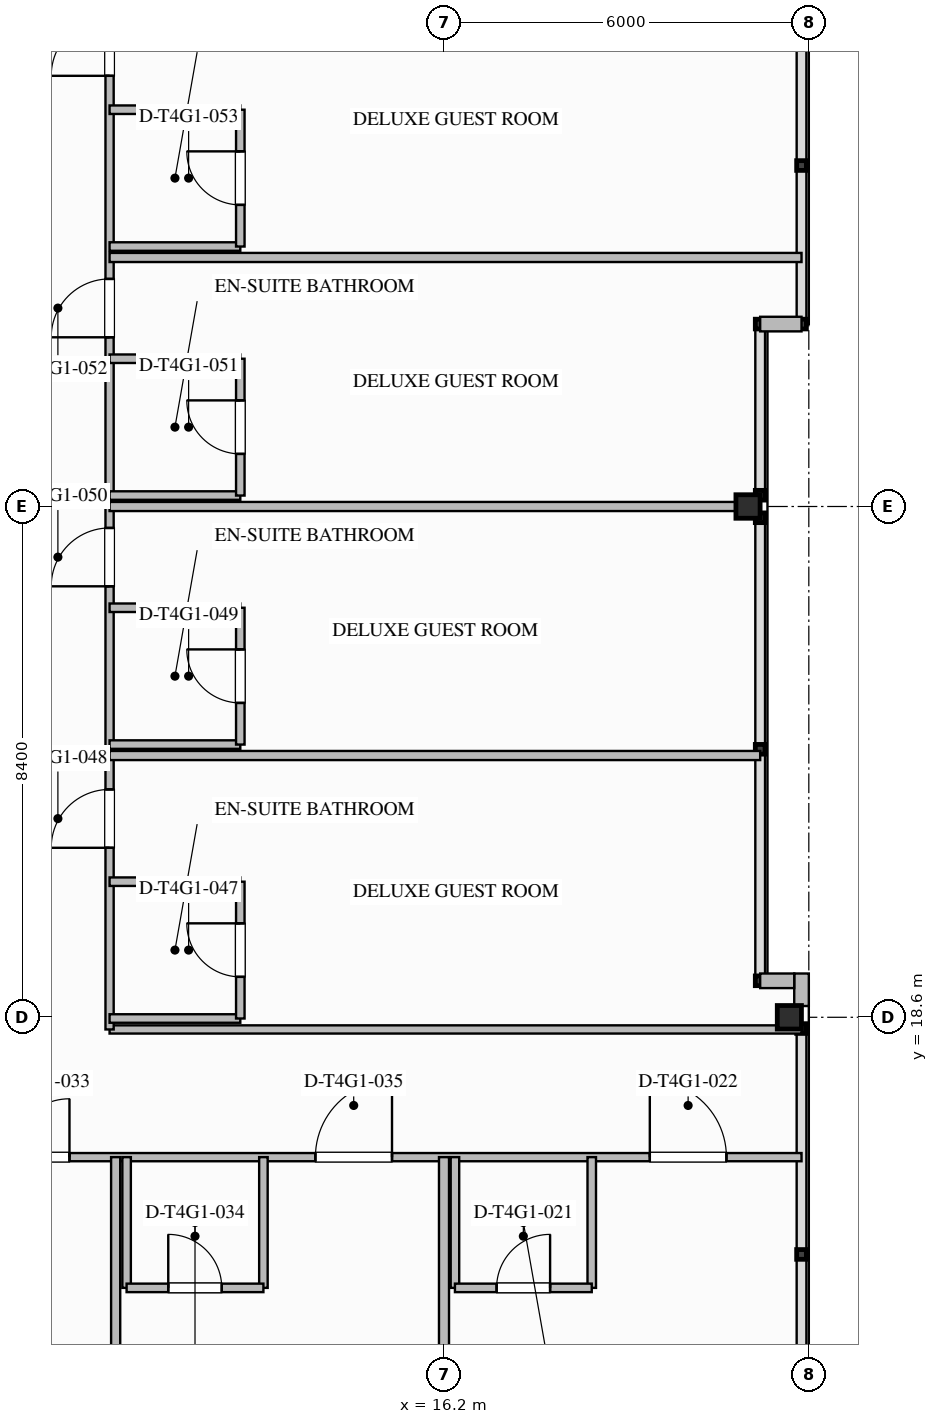
"""IFC4 building model, lengths in metres.
Left out: names, types, materials, properties, quantities, classifications, styles, units other than length and angle.
Written with IfcOpenShell. Run it as: python <this file> out.ifc"""

import sys

from ifc_helpers import new_model, si_unit, direction, frame, frame_2d, origin, origin_2d, place, context, subcontext, project, spatial, rectangle, i_section, extrude, element, fill, save


model = new_model("IFC4")
c1 = context("Model", 3, precision=1e-05, world=origin(), true_north=direction((0.0, 1.0)))
c2 = subcontext(c1, "Body", "Model", "MODEL_VIEW")
j1 = project(units=[si_unit("LENGTHUNIT", "METRE"), si_unit("PLANEANGLEUNIT", "RADIAN")], contexts=[c1])
p1 = place(None, origin())
s1 = spatial("IfcSite", under=j1, at=p1, CompositionType="ELEMENT")
p2 = place(p1, origin())
s2 = spatial("IfcBuilding", under=s1, at=p2, CompositionType="ELEMENT")
p3 = place(p2, frame((0.0, 0.0, 208.7)))
s3 = spatial("IfcBuildingStorey", under=s2, at=p3, CompositionType="ELEMENT", Elevation=208.7)
for number, where, z_axis, x_axis in (
    (1, (21.88, 18.6, 0.0), (0.0, 0.0, 1.0), (1.0, 0.0, 0.0)),
    (2, (21.2, 27.0, 0.0), (0.0, 0.0, 1.0), (1.0, 0.0, 0.0)),
):
    element("IfcColumn", number, at=place(p3, frame(where, z_axis=z_axis, x_axis=x_axis)), inside=s3, PredefinedType="COLUMN", context=c2, shape_type="SweptSolid", body=[
        extrude(i_section(OverallWidth=0.397, OverallDepth=0.387, WebThickness=0.021, FlangeThickness=0.033, FilletRadius=0.025, at=origin_2d()), origin(), (0.0, 0.0, 1.0), 3.597),
    ])
p4 = place(p3, frame((22.08, 19.32, 0.0), z_axis=(0.0, 0.0, 1.0), x_axis=(0.0, -1.0, 0.0)))
e3 = element("IfcWall", 3, at=p4, inside=s3, PredefinedType="STANDARD", context=c2, shape_type="SweptSolid", body=[
    extrude(rectangle(XDim=0.535, YDim=0.24, at=frame_2d((0.267, 0.0))), origin(), (0.0, 0.0, 1.0), 3.34),
])
p5 = place(p3, frame((22.08, 30.0, 0.0), z_axis=(0.0, 0.0, 1.0), x_axis=(-1.0, 0.0, 0.0)))
e4 = element("IfcWall", 4, at=p5, inside=s3, PredefinedType="STANDARD", context=c2, shape_type="SweptSolid", body=[
    extrude(rectangle(XDim=0.68, YDim=0.24, at=frame_2d((0.34, 0.0))), origin(), (0.0, 0.0, 1.0), 3.34),
])
p6 = place(p3, frame((21.4, 19.2, 0.0), z_axis=(0.0, 0.0, 1.0), x_axis=(1.0, 0.0, 0.0)))
e5 = element("IfcWall", 5, at=p6, inside=s3, PredefinedType="STANDARD", context=c2, shape_type="SweptSolid", body=[
    extrude(rectangle(XDim=0.56, YDim=0.24, at=frame_2d((0.28, 0.0))), origin(), (0.0, 0.0, 1.0), 3.34),
])
p7 = place(p3, frame((-16.2, 16.3, 0.0), z_axis=(0.0, 0.0, 1.0), x_axis=(1.0, 0.0, 0.0)))
e6 = element("IfcWall", 6, at=p7, inside=s3, PredefinedType="PARTITIONING", context=c2, shape_type="SweptSolid", body=[
    extrude(rectangle(XDim=38.28, YDim=0.135, at=frame_2d((19.14, 0.0))), origin(), (0.0, 0.0, 1.0), 3.34),
])
p8 = place(p7, frame((35.785, 0.0, 0.0)))
e7 = element("IfcOpeningElement", 7, at=p8, cuts=e6, PredefinedType="OPENING", context=c2, shape_type="SweptSolid", body=[
    extrude(rectangle(XDim=1.26, YDim=2.2, at=frame_2d((0.63, 1.1))), frame((0.0, 0.077, 0.0), z_axis=(0.0, -1.0, 0.0), x_axis=(1.0, 0.0, 0.0)), (0.0, 0.0, 1.0), 0.155),
])
p9 = place(p7, frame((3.285, 0.0, 0.0)))
e8 = element("IfcOpeningElement", 8, at=p9, cuts=e6, PredefinedType="OPENING", context=c2, shape_type="SweptSolid", body=[
    extrude(rectangle(XDim=1.26, YDim=2.2, at=frame_2d((0.63, 1.1))), frame((0.0, 0.077, 0.0), z_axis=(0.0, -1.0, 0.0), x_axis=(1.0, 0.0, 0.0)), (0.0, 0.0, 1.0), 0.155),
])
p10 = place(p7, frame((8.59, 0.0, 0.0)))
e9 = element("IfcOpeningElement", 9, at=p10, cuts=e6, PredefinedType="OPENING", context=c2, shape_type="SweptSolid", body=[
    extrude(rectangle(XDim=0.96, YDim=2.15, at=frame_2d((0.48, 1.075))), frame((0.0, 0.077, 0.0), z_axis=(0.0, -1.0, 0.0), x_axis=(1.0, 0.0, 0.0)), (0.0, 0.0, 1.0), 0.155),
])
p11 = place(p7, frame((12.744, 0.0, 0.0)))
e10 = element("IfcOpeningElement", 10, at=p11, cuts=e6, PredefinedType="OPENING", context=c2, shape_type="SweptSolid", body=[
    extrude(rectangle(XDim=1.02, YDim=2.15, at=frame_2d((0.51, 1.075))), frame((0.0, 0.077, 0.0), z_axis=(0.0, -1.0, 0.0), x_axis=(1.0, 0.0, 0.0)), (0.0, 0.0, 1.0), 0.155),
])
p12 = place(p7, frame((19.73, 0.0, 0.0)))
e11 = element("IfcOpeningElement", 11, at=p12, cuts=e6, PredefinedType="OPENING", context=c2, shape_type="SweptSolid", body=[
    extrude(rectangle(XDim=1.26, YDim=2.2, at=frame_2d((0.63, 1.1))), frame((0.0, 0.077, 0.0), z_axis=(0.0, -1.0, 0.0), x_axis=(1.0, 0.0, 0.0)), (0.0, 0.0, 1.0), 0.155),
])
p13 = place(p7, frame((25.281, 0.0, 0.0)))
e12 = element("IfcOpeningElement", 12, at=p13, cuts=e6, PredefinedType="OPENING", context=c2, shape_type="SweptSolid", body=[
    extrude(rectangle(XDim=0.96, YDim=2.15, at=frame_2d((0.48, 1.075))), frame((0.0, 0.077, 0.0), z_axis=(0.0, -1.0, 0.0), x_axis=(1.0, 0.0, 0.0)), (0.0, 0.0, 1.0), 0.155),
])
p14 = place(p7, frame((30.285, 0.0, 0.0)))
e13 = element("IfcOpeningElement", 13, at=p14, cuts=e6, PredefinedType="OPENING", context=c2, shape_type="SweptSolid", body=[
    extrude(rectangle(XDim=1.26, YDim=2.2, at=frame_2d((0.63, 1.1))), frame((0.0, 0.077, 0.0), z_axis=(0.0, -1.0, 0.0), x_axis=(1.0, 0.0, 0.0)), (0.0, 0.0, 1.0), 0.155),
])
p15 = place(p3, frame((10.7, 18.4, 0.0), z_axis=(0.0, 0.0, 1.0), x_axis=(1.0, 0.0, 0.0)))
e14 = element("IfcWall", 14, at=p15, inside=s3, PredefinedType="PARTITIONING", context=c2, shape_type="SweptSolid", body=[
    extrude(rectangle(XDim=11.38, YDim=0.135, at=frame_2d((5.69, 0.0))), origin(), (0.0, 0.0, 1.0), 2.718),
])
p16 = place(p3, frame((10.7, 18.4, 0.0), z_axis=(0.0, 0.0, 1.0), x_axis=(0.0, 1.0, 0.0)))
e15 = element("IfcWall", 15, at=p16, inside=s3, PredefinedType="PARTITIONING", context=c2, shape_type="SweptSolid", body=[
    extrude(rectangle(XDim=17.2, YDim=0.135, at=frame_2d((8.6, 0.0))), origin(), (0.0, 0.0, 1.0), 3.34),
])
p17 = place(p16, frame((2.987, 0.0, 0.0)))
e16 = element("IfcOpeningElement", 16, at=p17, cuts=e15, PredefinedType="OPENING", context=c2, shape_type="SweptSolid", body=[
    extrude(rectangle(XDim=0.96, YDim=2.15, at=frame_2d((0.48, 1.075))), frame((0.0, 0.077, 0.0), z_axis=(0.0, -1.0, 0.0), x_axis=(1.0, 0.0, 0.0)), (0.0, 0.0, 1.0), 0.155),
])
p18 = place(p16, frame((7.287, 0.0, 0.0)))
e17 = element("IfcOpeningElement", 17, at=p18, cuts=e15, PredefinedType="OPENING", context=c2, shape_type="SweptSolid", body=[
    extrude(rectangle(XDim=0.96, YDim=2.15, at=frame_2d((0.48, 1.075))), frame((0.0, 0.077, 0.0), z_axis=(0.0, -1.0, 0.0), x_axis=(1.0, 0.0, 0.0)), (0.0, 0.0, 1.0), 0.155),
])
p19 = place(p16, frame((11.383, 0.0, 0.0)))
e18 = element("IfcOpeningElement", 18, at=p19, cuts=e15, PredefinedType="OPENING", context=c2, shape_type="SweptSolid", body=[
    extrude(rectangle(XDim=0.96, YDim=2.15, at=frame_2d((0.48, 1.075))), frame((0.0, 0.077, 0.0), z_axis=(0.0, -1.0, 0.0), x_axis=(1.0, 0.0, 0.0)), (0.0, 0.0, 1.0), 0.155),
])
p20 = place(p16, frame((15.683, 0.0, 0.0)))
e19 = element("IfcOpeningElement", 19, at=p20, cuts=e15, PredefinedType="OPENING", context=c2, shape_type="SweptSolid", body=[
    extrude(rectangle(XDim=0.96, YDim=2.15, at=frame_2d((0.48, 1.075))), frame((0.0, 0.077, 0.0), z_axis=(0.0, -1.0, 0.0), x_axis=(1.0, 0.0, 0.0)), (0.0, 0.0, 1.0), 0.155),
])
p21 = place(p3, frame((16.2, 0.12, 0.0), z_axis=(0.0, 0.0, 1.0), x_axis=(0.0, 1.0, 0.0)))
e20 = element("IfcWall", 20, at=p21, inside=s3, PredefinedType="PARTITIONING", context=c2, shape_type="SweptSolid", body=[
    extrude(rectangle(XDim=16.18, YDim=0.165, at=frame_2d((8.09, 0.0))), origin(), (0.0, 0.0, 1.0), 2.714),
])
p22 = place(p3, frame((16.38, 16.3, 0.0), z_axis=(0.0, 0.0, 1.0), x_axis=(0.0, -1.0, 0.0)))
e21 = element("IfcWall", 21, at=p22, inside=s3, PredefinedType="PLUMBINGWALL", context=c2, shape_type="SweptSolid", body=[
    extrude(rectangle(XDim=2.15, YDim=0.14, at=frame_2d((1.075, 0.0))), origin(), (0.0, 0.0, 1.0), 2.714),
])
p23 = place(p3, frame((18.63, 16.3, 0.0), z_axis=(0.0, 0.0, 1.0), x_axis=(0.0, -1.0, 0.0)))
e22 = element("IfcWall", 22, at=p23, inside=s3, PredefinedType="PLUMBINGWALL", context=c2, shape_type="SweptSolid", body=[
    extrude(rectangle(XDim=2.15, YDim=0.14, at=frame_2d((1.075, 0.0))), origin(), (0.0, 0.0, 1.0), 3.34),
])
p24 = place(p3, frame((16.38, 14.15, 0.0), z_axis=(0.0, 0.0, 1.0), x_axis=(1.0, 0.0, 0.0)))
e23 = element("IfcWall", 23, at=p24, inside=s3, PredefinedType="PLUMBINGWALL", context=c2, shape_type="SweptSolid", body=[
    extrude(rectangle(XDim=2.25, YDim=0.14, at=frame_2d((1.125, 0.0))), origin(), (0.0, 0.0, 1.0), 3.34),
])
p25 = place(p24, frame((0.685, 0.0, 0.0)))
e24 = element("IfcOpeningElement", 24, at=p25, cuts=e23, PredefinedType="OPENING", context=c2, shape_type="SweptSolid", body=[
    extrude(rectangle(XDim=0.88, YDim=2.1, at=frame_2d((0.44, 1.05))), frame((0.0, 0.08, 0.0), z_axis=(0.0, -1.0, 0.0), x_axis=(1.0, 0.0, 0.0)), (0.0, 0.0, 1.0), 0.16),
])
p26 = place(p3, frame((10.8, 0.12, 0.0), z_axis=(0.0, 0.0, 1.0), x_axis=(0.0, 1.0, 0.0)))
e25 = element("IfcWall", 25, at=p26, inside=s3, PredefinedType="PARTITIONING", context=c2, shape_type="SweptSolid", body=[
    extrude(rectangle(XDim=16.18, YDim=0.15, at=frame_2d((8.09, 0.0))), origin(), (0.0, 0.0, 1.0), 3.34),
])
for number, where, z_axis, x_axis in (
    (26, (10.98, 16.3, 0.0), (0.0, 0.0, 1.0), (0.0, -1.0, 0.0)),
    (27, (13.23, 16.3, 0.0), (0.0, 0.0, 1.0), (0.0, -1.0, 0.0)),
):
    element("IfcWall", number, at=place(p3, frame(where, z_axis=z_axis, x_axis=x_axis)), inside=s3, PredefinedType="PLUMBINGWALL", context=c2, shape_type="SweptSolid", body=[
        extrude(rectangle(XDim=2.15, YDim=0.14, at=frame_2d((1.075, 0.0))), origin(), (0.0, 0.0, 1.0), 3.34),
    ])
p27 = place(p3, frame((10.98, 14.15, 0.0), z_axis=(0.0, 0.0, 1.0), x_axis=(1.0, 0.0, 0.0)))
e28 = element("IfcWall", 28, at=p27, inside=s3, PredefinedType="PLUMBINGWALL", context=c2, shape_type="SweptSolid", body=[
    extrude(rectangle(XDim=2.25, YDim=0.14, at=frame_2d((1.125, 0.0))), origin(), (0.0, 0.0, 1.0), 3.34),
])
p28 = place(p27, frame((0.685, 0.0, 0.0)))
e29 = element("IfcOpeningElement", 29, at=p28, cuts=e28, PredefinedType="OPENING", context=c2, shape_type="SweptSolid", body=[
    extrude(rectangle(XDim=0.88, YDim=2.1, at=frame_2d((0.44, 1.05))), frame((0.0, 0.08, 0.0), z_axis=(0.0, -1.0, 0.0), x_axis=(1.0, 0.0, 0.0)), (0.0, 0.0, 1.0), 0.16),
])
p29 = place(p3, frame((10.7, 18.58, 0.0), z_axis=(0.0, 0.0, 1.0), x_axis=(1.0, 0.0, 0.0)))
e30 = element("IfcWall", 30, at=p29, inside=s3, PredefinedType="PLUMBINGWALL", context=c2, shape_type="SweptSolid", body=[
    extrude(rectangle(XDim=2.15, YDim=0.14, at=frame_2d((1.075, 0.0))), origin(), (0.0, 0.0, 1.0), 2.718),
])
p30 = place(p3, frame((10.7, 20.83, 0.0), z_axis=(0.0, 0.0, 1.0), x_axis=(1.0, 0.0, 0.0)))
e31 = element("IfcWall", 31, at=p30, inside=s3, PredefinedType="PLUMBINGWALL", context=c2, shape_type="SweptSolid", body=[
    extrude(rectangle(XDim=2.15, YDim=0.14, at=frame_2d((1.075, 0.0))), origin(), (0.0, 0.0, 1.0), 3.34),
])
p31 = place(p3, frame((12.85, 18.58, 0.0), z_axis=(0.0, 0.0, 1.0), x_axis=(0.0, 1.0, 0.0)))
e32 = element("IfcWall", 32, at=p31, inside=s3, PredefinedType="PLUMBINGWALL", context=c2, shape_type="SweptSolid", body=[
    extrude(rectangle(XDim=2.25, YDim=0.14, at=frame_2d((1.125, 0.0))), origin(), (0.0, 0.0, 1.0), 3.34),
])
p32 = place(p31, frame((0.685, 0.0, 0.0)))
e33 = element("IfcOpeningElement", 33, at=p32, cuts=e32, PredefinedType="OPENING", context=c2, shape_type="SweptSolid", body=[
    extrude(rectangle(XDim=0.88, YDim=2.1, at=frame_2d((0.44, 1.05))), frame((0.0, 0.08, 0.0), z_axis=(0.0, -1.0, 0.0), x_axis=(1.0, 0.0, 0.0)), (0.0, 0.0, 1.0), 0.16),
])
p33 = place(p3, frame((10.7, 22.905, 0.0), z_axis=(0.0, 0.0, 1.0), x_axis=(1.0, 0.0, 0.0)))
e34 = element("IfcWall", 34, at=p33, inside=s3, PredefinedType="PARTITIONING", context=c2, shape_type="SweptSolid", body=[
    extrude(rectangle(XDim=10.7, YDim=0.15, at=frame_2d((5.35, 0.0))), origin(), (0.0, 0.0, 1.0), 3.34),
])
for number, where, z_axis, x_axis in (
    (35, (10.7, 23.085, 0.0), (0.0, 0.0, 1.0), (1.0, 0.0, 0.0)),
    (36, (10.7, 25.335, 0.0), (0.0, 0.0, 1.0), (1.0, 0.0, 0.0)),
):
    element("IfcWall", number, at=place(p3, frame(where, z_axis=z_axis, x_axis=x_axis)), inside=s3, PredefinedType="PLUMBINGWALL", context=c2, shape_type="SweptSolid", body=[
        extrude(rectangle(XDim=2.15, YDim=0.14, at=frame_2d((1.075, 0.0))), origin(), (0.0, 0.0, 1.0), 3.34),
    ])
p34 = place(p3, frame((12.85, 23.085, 0.0), z_axis=(0.0, 0.0, 1.0), x_axis=(0.0, 1.0, 0.0)))
e37 = element("IfcWall", 37, at=p34, inside=s3, PredefinedType="PLUMBINGWALL", context=c2, shape_type="SweptSolid", body=[
    extrude(rectangle(XDim=2.25, YDim=0.14, at=frame_2d((1.125, 0.0))), origin(), (0.0, 0.0, 1.0), 3.34),
])
p35 = place(p34, frame((0.685, 0.0, 0.0)))
e38 = element("IfcOpeningElement", 38, at=p35, cuts=e37, PredefinedType="OPENING", context=c2, shape_type="SweptSolid", body=[
    extrude(rectangle(XDim=0.88, YDim=2.1, at=frame_2d((0.44, 1.05))), frame((0.0, 0.08, 0.0), z_axis=(0.0, -1.0, 0.0), x_axis=(1.0, 0.0, 0.0)), (0.0, 0.0, 1.0), 0.16),
])
p36 = place(p3, frame((10.7, 27.0, 0.0), z_axis=(0.0, 0.0, 1.0), x_axis=(1.0, 0.0, 0.0)))
e39 = element("IfcWall", 39, at=p36, inside=s3, PredefinedType="PARTITIONING", context=c2, shape_type="SweptSolid", body=[
    extrude(rectangle(XDim=10.7, YDim=0.15, at=frame_2d((5.35, 0.0))), origin(), (0.0, 0.0, 1.0), 2.718),
])
p37 = place(p3, frame((10.7, 27.18, 0.0), z_axis=(0.0, 0.0, 1.0), x_axis=(1.0, 0.0, 0.0)))
e40 = element("IfcWall", 40, at=p37, inside=s3, PredefinedType="PLUMBINGWALL", context=c2, shape_type="SweptSolid", body=[
    extrude(rectangle(XDim=2.15, YDim=0.14, at=frame_2d((1.075, 0.0))), origin(), (0.0, 0.0, 1.0), 2.718),
])
p38 = place(p3, frame((10.7, 29.43, 0.0), z_axis=(0.0, 0.0, 1.0), x_axis=(1.0, 0.0, 0.0)))
e41 = element("IfcWall", 41, at=p38, inside=s3, PredefinedType="PLUMBINGWALL", context=c2, shape_type="SweptSolid", body=[
    extrude(rectangle(XDim=2.15, YDim=0.14, at=frame_2d((1.075, 0.0))), origin(), (0.0, 0.0, 1.0), 3.34),
])
p39 = place(p3, frame((12.85, 27.18, 0.0), z_axis=(0.0, 0.0, 1.0), x_axis=(0.0, 1.0, 0.0)))
e42 = element("IfcWall", 42, at=p39, inside=s3, PredefinedType="PLUMBINGWALL", context=c2, shape_type="SweptSolid", body=[
    extrude(rectangle(XDim=2.25, YDim=0.14, at=frame_2d((1.125, 0.0))), origin(), (0.0, 0.0, 1.0), 3.34),
])
p40 = place(p39, frame((0.685, 0.0, 0.0)))
e43 = element("IfcOpeningElement", 43, at=p40, cuts=e42, PredefinedType="OPENING", context=c2, shape_type="SweptSolid", body=[
    extrude(rectangle(XDim=0.88, YDim=2.1, at=frame_2d((0.44, 1.05))), frame((0.0, 0.08, 0.0), z_axis=(0.0, -1.0, 0.0), x_axis=(1.0, 0.0, 0.0)), (0.0, 0.0, 1.0), 0.16),
])
p41 = place(p3, frame((10.7, 31.095, 0.0), z_axis=(0.0, 0.0, 1.0), x_axis=(1.0, 0.0, 0.0)))
e44 = element("IfcWall", 44, at=p41, inside=s3, PredefinedType="PARTITIONING", context=c2, shape_type="SweptSolid", body=[
    extrude(rectangle(XDim=11.38, YDim=0.15, at=frame_2d((5.69, 0.0))), origin(), (0.0, 0.0, 1.0), 3.34),
])
for number, where, z_axis, x_axis in (
    (45, (10.7, 31.275, 0.0), (0.0, 0.0, 1.0), (1.0, 0.0, 0.0)),
    (46, (10.7, 33.525, 0.0), (0.0, 0.0, 1.0), (1.0, 0.0, 0.0)),
):
    element("IfcWall", number, at=place(p3, frame(where, z_axis=z_axis, x_axis=x_axis)), inside=s3, PredefinedType="PLUMBINGWALL", context=c2, shape_type="SweptSolid", body=[
        extrude(rectangle(XDim=2.15, YDim=0.14, at=frame_2d((1.075, 0.0))), origin(), (0.0, 0.0, 1.0), 3.34),
    ])
p42 = place(p3, frame((12.85, 31.275, 0.0), z_axis=(0.0, 0.0, 1.0), x_axis=(0.0, 1.0, 0.0)))
e47 = element("IfcWall", 47, at=p42, inside=s3, PredefinedType="PLUMBINGWALL", context=c2, shape_type="SweptSolid", body=[
    extrude(rectangle(XDim=2.25, YDim=0.14, at=frame_2d((1.125, 0.0))), origin(), (0.0, 0.0, 1.0), 3.34),
])
p43 = place(p42, frame((0.685, 0.0, 0.0)))
e48 = element("IfcOpeningElement", 48, at=p43, cuts=e47, PredefinedType="OPENING", context=c2, shape_type="SweptSolid", body=[
    extrude(rectangle(XDim=0.88, YDim=2.1, at=frame_2d((0.44, 1.05))), frame((0.0, 0.08, 0.0), z_axis=(0.0, -1.0, 0.0), x_axis=(1.0, 0.0, 0.0)), (0.0, 0.0, 1.0), 0.16),
])
p44 = place(p25, origin())
e49 = element("IfcDoor", 49, at=p44, inside=s3, OperationType="SINGLE_SWING_RIGHT", PredefinedType="DOOR", context=c2, shape_type="SweptSolid", body=[
    extrude(rectangle(XDim=0.88, YDim=2.1, at=frame_2d((0.44, 1.05))), frame((0.0, 0.025, 0.0), z_axis=(0.0, -1.0, 0.0), x_axis=(1.0, 0.0, 0.0)), (0.0, 0.0, 1.0), 0.05),
])
fill(e24, e49)
p45 = place(p8, origin())
e50 = element("IfcDoor", 50, at=p45, inside=s3, OperationType="SINGLE_SWING_LEFT", PredefinedType="DOOR", context=c2, shape_type="SweptSolid", body=[
    extrude(rectangle(XDim=1.26, YDim=2.2, at=frame_2d((0.63, 1.1))), frame((0.0, 0.025, 0.0), z_axis=(0.0, -1.0, 0.0), x_axis=(1.0, 0.0, 0.0)), (0.0, 0.0, 1.0), 0.05),
])
fill(e7, e50)
p46 = place(p13, origin())
e51 = element("IfcDoor", 51, at=p46, inside=s3, OperationType="SINGLE_SWING_RIGHT", PredefinedType="DOOR", context=c2, shape_type="SweptSolid", body=[
    extrude(rectangle(XDim=0.96, YDim=2.15, at=frame_2d((0.48, 1.075))), frame((0.0, 0.025, 0.0), z_axis=(0.0, -1.0, 0.0), x_axis=(1.0, 0.0, 0.0)), (0.0, 0.0, 1.0), 0.05),
])
fill(e12, e51)
p47 = place(p28, origin())
e52 = element("IfcDoor", 52, at=p47, inside=s3, OperationType="SINGLE_SWING_LEFT", PredefinedType="DOOR", context=c2, shape_type="SweptSolid", body=[
    extrude(rectangle(XDim=0.88, YDim=2.1, at=frame_2d((0.44, 1.05))), frame((0.0, 0.025, 0.0), z_axis=(0.0, -1.0, 0.0), x_axis=(1.0, 0.0, 0.0)), (0.0, 0.0, 1.0), 0.05),
])
fill(e29, e52)
p48 = place(p14, origin())
e53 = element("IfcDoor", 53, at=p48, inside=s3, OperationType="SINGLE_SWING_RIGHT", PredefinedType="DOOR", context=c2, shape_type="SweptSolid", body=[
    extrude(rectangle(XDim=1.26, YDim=2.2, at=frame_2d((0.63, 1.1))), frame((0.0, 0.025, 0.0), z_axis=(0.0, -1.0, 0.0), x_axis=(1.0, 0.0, 0.0)), (0.0, 0.0, 1.0), 0.05),
])
fill(e13, e53)
p49 = place(p32, origin())
e54 = element("IfcDoor", 54, at=p49, inside=s3, OperationType="SINGLE_SWING_RIGHT", PredefinedType="DOOR", context=c2, shape_type="SweptSolid", body=[
    extrude(rectangle(XDim=0.88, YDim=2.1, at=frame_2d((0.44, 1.05))), frame((0.0, 0.025, 0.0), z_axis=(0.0, -1.0, 0.0), x_axis=(1.0, 0.0, 0.0)), (0.0, 0.0, 1.0), 0.05),
])
fill(e33, e54)
p50 = place(p17, origin())
e55 = element("IfcDoor", 55, at=p50, inside=s3, OperationType="SINGLE_SWING_LEFT", PredefinedType="DOOR", context=c2, shape_type="SweptSolid", body=[
    extrude(rectangle(XDim=0.96, YDim=2.15, at=frame_2d((0.48, 1.075))), frame((0.0, 0.025, 0.0), z_axis=(0.0, -1.0, 0.0), x_axis=(1.0, 0.0, 0.0)), (0.0, 0.0, 1.0), 0.05),
])
fill(e16, e55)
p51 = place(p35, origin())
e56 = element("IfcDoor", 56, at=p51, inside=s3, OperationType="SINGLE_SWING_RIGHT", PredefinedType="DOOR", context=c2, shape_type="SweptSolid", body=[
    extrude(rectangle(XDim=0.88, YDim=2.1, at=frame_2d((0.44, 1.05))), frame((0.0, 0.025, 0.0), z_axis=(0.0, -1.0, 0.0), x_axis=(1.0, 0.0, 0.0)), (0.0, 0.0, 1.0), 0.05),
])
fill(e38, e56)
p52 = place(p18, origin())
e57 = element("IfcDoor", 57, at=p52, inside=s3, OperationType="SINGLE_SWING_LEFT", PredefinedType="DOOR", context=c2, shape_type="SweptSolid", body=[
    extrude(rectangle(XDim=0.96, YDim=2.15, at=frame_2d((0.48, 1.075))), frame((0.0, 0.025, 0.0), z_axis=(0.0, -1.0, 0.0), x_axis=(1.0, 0.0, 0.0)), (0.0, 0.0, 1.0), 0.05),
])
fill(e17, e57)
p53 = place(p40, origin())
e58 = element("IfcDoor", 58, at=p53, inside=s3, OperationType="SINGLE_SWING_RIGHT", PredefinedType="DOOR", context=c2, shape_type="SweptSolid", body=[
    extrude(rectangle(XDim=0.88, YDim=2.1, at=frame_2d((0.44, 1.05))), frame((0.0, 0.025, 0.0), z_axis=(0.0, -1.0, 0.0), x_axis=(1.0, 0.0, 0.0)), (0.0, 0.0, 1.0), 0.05),
])
fill(e43, e58)
p54 = place(p19, origin())
e59 = element("IfcDoor", 59, at=p54, inside=s3, OperationType="SINGLE_SWING_LEFT", PredefinedType="DOOR", context=c2, shape_type="SweptSolid", body=[
    extrude(rectangle(XDim=0.96, YDim=2.15, at=frame_2d((0.48, 1.075))), frame((0.0, 0.025, 0.0), z_axis=(0.0, -1.0, 0.0), x_axis=(1.0, 0.0, 0.0)), (0.0, 0.0, 1.0), 0.05),
])
fill(e18, e59)
p55 = place(p43, origin())
e60 = element("IfcDoor", 60, at=p55, inside=s3, OperationType="SINGLE_SWING_RIGHT", PredefinedType="DOOR", context=c2, shape_type="SweptSolid", body=[
    extrude(rectangle(XDim=0.88, YDim=2.1, at=frame_2d((0.44, 1.05))), frame((0.0, 0.025, 0.0), z_axis=(0.0, -1.0, 0.0), x_axis=(1.0, 0.0, 0.0)), (0.0, 0.0, 1.0), 0.05),
])
fill(e48, e60)
p56 = place(p20, origin())
e61 = element("IfcDoor", 61, at=p56, inside=s3, OperationType="SINGLE_SWING_LEFT", PredefinedType="DOOR", context=c2, shape_type="SweptSolid", body=[
    extrude(rectangle(XDim=0.96, YDim=2.15, at=frame_2d((0.48, 1.075))), frame((0.0, 0.025, 0.0), z_axis=(0.0, -1.0, 0.0), x_axis=(1.0, 0.0, 0.0)), (0.0, 0.0, 1.0), 0.05),
])
fill(e19, e61)
save(model, sys.argv[1])
